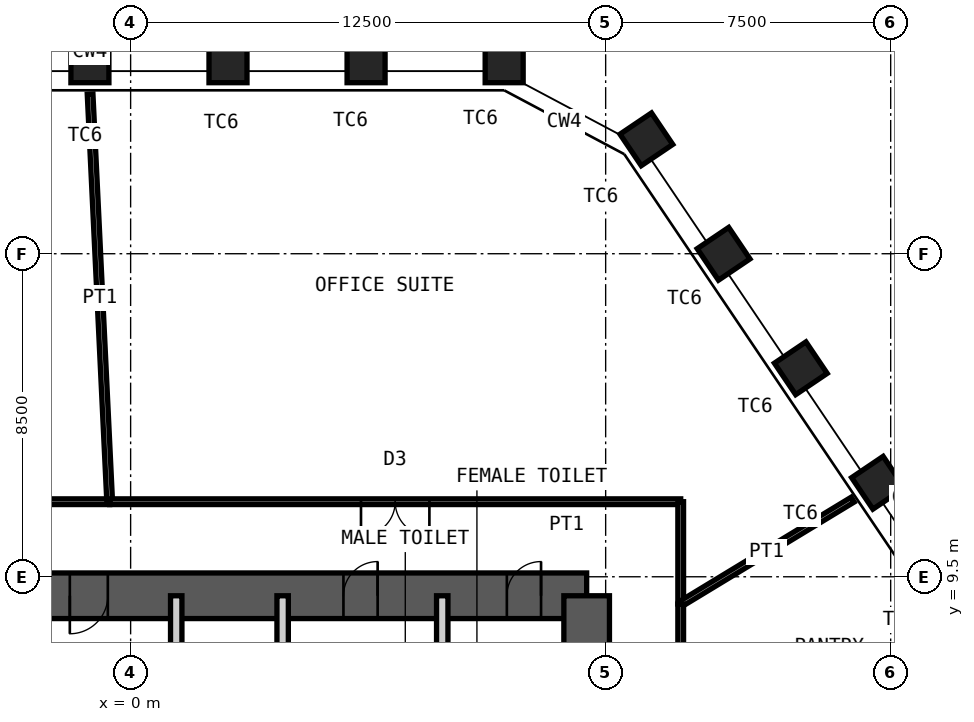
"""IFC4 building model, lengths in metres.
Left out: names, types, materials, properties, quantities, classifications, styles, units other than length and angle.
Written with IfcOpenShell. Run it as: python <this file> out.ifc"""

import sys

from ifc_helpers import new_model, si_unit, direction, frame, frame_2d, origin, origin_2d, place, context, subcontext, project, spatial, rectangle, hollow_rectangle, extrude, element, fill, save


model = new_model("IFC4")
c1 = context("Model", 3, precision=1e-05, world=origin(), true_north=direction((0.0, 1.0)))
c2 = subcontext(c1, "Body", "Model", "MODEL_VIEW")
j1 = project(units=[si_unit("LENGTHUNIT", "METRE"), si_unit("PLANEANGLEUNIT", "RADIAN")], contexts=[c1])
p1 = place(None, origin())
s1 = spatial("IfcSite", under=j1, at=p1, CompositionType="ELEMENT")
p2 = place(p1, origin())
s2 = spatial("IfcBuilding", under=s1, at=p2, CompositionType="ELEMENT")
p3 = place(p2, frame((0.0, 0.0, 222.4)))
s3 = spatial("IfcBuildingStorey", under=s2, at=p3, CompositionType="ELEMENT", Elevation=222.4)
for number, where, z_axis, x_axis in (
    (1, (-1.071, 23.0, 0.0), (0.0, 0.0, 1.0), (-1.0, 0.0, 0.0)),
    (2, (2.562, 23.0, 0.0), (0.0, 0.0, 1.0), (-1.0, 0.0, 0.0)),
    (3, (6.196, 23.0, 0.0), (0.0, 0.0, 1.0), (-1.0, 0.0, 0.0)),
    (4, (9.829, 23.0, 0.0), (0.0, 0.0, 1.0), (-1.0, 0.0, 0.0)),
    (5, (13.571, 21.01, 0.0), (0.0, 0.0, 1.0), (-0.559, 0.829, 0.0)),
    (6, (15.603, 17.998, 0.0), (0.0, 0.0, 1.0), (-0.559, 0.829, 0.0)),
    (7, (17.635, 14.986, 0.0), (0.0, 0.0, 1.0), (-0.559, 0.829, 0.0)),
    (8, (19.667, 11.973, 0.0), (0.0, 0.0, 1.0), (-0.559, 0.829, 0.0)),
):
    element("IfcColumn", number, at=place(p3, frame(where, z_axis=z_axis, x_axis=x_axis)), inside=s3, PredefinedType="COLUMN", context=c2, shape_type="SweptSolid", body=[
        extrude(hollow_rectangle(XDim=1.0, YDim=1.0, WallThickness=0.06, at=origin_2d()), origin(), (0.0, 0.0, 1.0), 4.2),
    ])
p4 = place(p3, frame((-12.0, 9.0, 0.0), z_axis=(0.0, 0.0, 1.0), x_axis=(1.0, 0.0, 0.0)))
e9 = element("IfcWall", 9, at=p4, inside=s3, PredefinedType="SHEAR", context=c2, shape_type="SweptSolid", body=[
    extrude(rectangle(XDim=24.0, YDim=1.2, at=frame_2d((12.0, 0.0))), origin(), (0.0, 0.0, 1.0), 4.2),
])
p5 = place(p4, frame((10.4, 0.0, 0.0)))
e10 = element("IfcOpeningElement", 10, at=p5, cuts=e9, PredefinedType="OPENING", context=c2, shape_type="SweptSolid", body=[
    extrude(rectangle(XDim=1.0, YDim=2.1, at=frame_2d((0.5, 1.05))), frame((0.0, 0.61, 0.0), z_axis=(0.0, -1.0, 0.0), x_axis=(1.0, 0.0, 0.0)), (0.0, 0.0, 1.0), 1.22),
])
p6 = place(p4, frame((17.6, 0.0, 0.0)))
e11 = element("IfcOpeningElement", 11, at=p6, cuts=e9, PredefinedType="OPENING", context=c2, shape_type="SweptSolid", body=[
    extrude(rectangle(XDim=0.9, YDim=2.1, at=frame_2d((0.45, 1.05))), frame((0.0, 0.61, 0.0), z_axis=(0.0, -1.0, 0.0), x_axis=(1.0, 0.0, 0.0)), (0.0, 0.0, 1.0), 1.22),
])
p7 = place(p4, frame((21.9, 0.0, 0.0)))
e12 = element("IfcOpeningElement", 12, at=p7, cuts=e9, PredefinedType="OPENING", context=c2, shape_type="SweptSolid", body=[
    extrude(rectangle(XDim=0.9, YDim=2.1, at=frame_2d((0.45, 1.05))), frame((0.0, 0.61, 0.0), z_axis=(0.0, -1.0, 0.0), x_axis=(1.0, 0.0, 0.0)), (0.0, 0.0, 1.0), 1.22),
])
p8 = place(p3, frame((12.0, -9.0, 0.0), z_axis=(0.0, 0.0, 1.0), x_axis=(0.0, 1.0, 0.0)))
e13 = element("IfcWall", 13, at=p8, inside=s3, PredefinedType="SHEAR", context=c2, shape_type="SweptSolid", body=[
    extrude(rectangle(XDim=18.0, YDim=1.2, at=frame_2d((9.0, 0.0))), origin(), (0.0, 0.0, 1.0), 4.2),
])
p9 = place(p8, frame((8.1, 0.0, 0.0)))
e14 = element("IfcOpeningElement", 14, at=p9, cuts=e13, PredefinedType="OPENING", context=c2, shape_type="SweptSolid", body=[
    extrude(rectangle(XDim=1.8, YDim=2.1, at=frame_2d((0.9, 1.05))), frame((0.0, 0.61, 0.0), z_axis=(0.0, -1.0, 0.0), x_axis=(1.0, 0.0, 0.0)), (0.0, 0.0, 1.0), 1.22),
])
p10 = place(p3, frame((1.2, 5.15, 0.0), z_axis=(0.0, 0.0, 1.0), x_axis=(0.0, 1.0, 0.0)))
e15 = element("IfcWall", 15, at=p10, inside=s3, PredefinedType="PARTITIONING", context=c2, shape_type="SweptSolid", body=[
    extrude(rectangle(XDim=3.85, YDim=0.3, at=frame_2d((1.925, 0.0))), origin(), (0.0, 0.0, 1.0), 3.98),
])
p11 = place(p10, frame((1.375, 0.0, 0.0)))
e16 = element("IfcOpeningElement", 16, at=p11, cuts=e15, PredefinedType="OPENING", context=c2, shape_type="SweptSolid", body=[
    extrude(rectangle(XDim=1.1, YDim=2.4, at=frame_2d((0.55, 1.2))), frame((0.0, 0.16, 0.0), z_axis=(0.0, -1.0, 0.0), x_axis=(1.0, 0.0, 0.0)), (0.0, 0.0, 1.0), 0.32),
])
for number, where, z_axis, x_axis in (
    (17, (4.0, 5.15, 0.0), (0.0, 0.0, 1.0), (0.0, 1.0, 0.0)),
    (18, (8.2, 5.15, 0.0), (0.0, 0.0, 1.0), (0.0, 1.0, 0.0)),
):
    element("IfcWall", number, at=place(p3, frame(where, z_axis=z_axis, x_axis=x_axis)), inside=s3, PredefinedType="PARTITIONING", context=c2, shape_type="SweptSolid", body=[
        extrude(rectangle(XDim=3.85, YDim=0.3, at=frame_2d((1.925, 0.0))), origin(), (0.0, 0.0, 1.0), 3.98),
    ])
p12 = place(p3, frame((-8.267, 11.475, 0.0), z_axis=(0.0, 0.0, 1.0), x_axis=(1.0, 0.0, 0.0)))
e19 = element("IfcWall", 19, at=p12, inside=s3, PredefinedType="PARTITIONING", context=c2, shape_type="SweptSolid", body=[
    extrude(rectangle(XDim=7.716, YDim=0.15, at=frame_2d((3.858, 0.0))), origin(), (0.0, 0.0, 1.0), 4.03),
])
p13 = place(p12, frame((2.958, 0.0, 0.0)))
e20 = element("IfcOpeningElement", 20, at=p13, cuts=e19, PredefinedType="OPENING", context=c2, shape_type="SweptSolid", body=[
    extrude(rectangle(XDim=1.8, YDim=2.4, at=frame_2d((0.9, 1.2))), frame((0.0, 0.085, 0.0), z_axis=(0.0, -1.0, 0.0), x_axis=(1.0, 0.0, 0.0)), (0.0, 0.0, 1.0), 0.17),
])
p14 = place(p3, frame((-1.067, 22.2, 0.0), z_axis=(0.0, 0.0, 1.0), x_axis=(0.047998335863, -0.998847415652, 0.0)))
e21 = element("IfcWall", 21, at=p14, inside=s3, PredefinedType="PARTITIONING", context=c2, shape_type="SweptSolid", body=[
    extrude(rectangle(XDim=10.738, YDim=0.15, at=frame_2d((5.369, 0.0))), origin(), (0.0, 0.0, 1.0), 3.43),
])
p15 = place(p3, frame((-0.551, 11.475, 0.0), z_axis=(0.0, 0.0, 1.0), x_axis=(1.0, 0.0, 0.0)))
e22 = element("IfcWall", 22, at=p15, inside=s3, PredefinedType="PARTITIONING", context=c2, shape_type="SweptSolid", body=[
    extrude(rectangle(XDim=15.026, YDim=0.15, at=frame_2d((7.513, 0.0))), origin(), (0.0, 0.0, 1.0), 4.03),
])
p16 = place(p15, frame((6.613, 0.0, 0.0)))
e23 = element("IfcOpeningElement", 23, at=p16, cuts=e22, PredefinedType="OPENING", context=c2, shape_type="SweptSolid", body=[
    extrude(rectangle(XDim=1.8, YDim=2.4, at=frame_2d((0.9, 1.2))), frame((0.0, 0.085, 0.0), z_axis=(0.0, -1.0, 0.0), x_axis=(1.0, 0.0, 0.0)), (0.0, 0.0, 1.0), 0.17),
])
p17 = place(p3, frame((14.475, 11.475, 0.0), z_axis=(0.0, 0.0, 1.0), x_axis=(0.0, -1.0, 0.0)))
e24 = element("IfcWall", 24, at=p17, inside=s3, PredefinedType="PARTITIONING", context=c2, shape_type="SweptSolid", body=[
    extrude(rectangle(XDim=2.692, YDim=0.15, at=frame_2d((1.346, 0.0))), origin(), (0.0, 0.0, 1.0), 4.03),
])
p18 = place(p3, frame((19.001, 11.53, 0.0), z_axis=(0.0, 0.0, 1.0), x_axis=(-0.854906581035, -0.518781975114, 0.0)))
e25 = element("IfcWall", 25, at=p18, inside=s3, PredefinedType="PARTITIONING", context=c2, shape_type="SweptSolid", body=[
    extrude(rectangle(XDim=5.294, YDim=0.15, at=frame_2d((2.647, 0.0))), origin(), (0.0, 0.0, 1.0), 3.43),
])
p19 = place(p3, frame((14.475, 8.783, 0.0), z_axis=(0.0, 0.0, 1.0), x_axis=(0.0, -1.0, 0.0)))
e26 = element("IfcWall", 26, at=p19, inside=s3, PredefinedType="PARTITIONING", context=c2, shape_type="SweptSolid", body=[
    extrude(rectangle(XDim=5.309, YDim=0.15, at=frame_2d((2.654, 0.0))), origin(), (0.0, 0.0, 1.0), 4.03),
])
p20 = place(p19, frame((2.154, 0.0, 0.0)))
e27 = element("IfcOpeningElement", 27, at=p20, cuts=e26, PredefinedType="OPENING", context=c2, shape_type="SweptSolid", body=[
    extrude(rectangle(XDim=1.0, YDim=2.4, at=frame_2d((0.5, 1.2))), frame((0.0, 0.085, 0.0), z_axis=(0.0, -1.0, 0.0), x_axis=(1.0, 0.0, 0.0)), (0.0, 0.0, 1.0), 0.17),
])
p21 = place(p5, origin())
e28 = element("IfcDoor", 28, at=p21, inside=s3, OperationType="SINGLE_SWING_LEFT", PredefinedType="DOOR", context=c2, shape_type="SweptSolid", body=[
    extrude(rectangle(XDim=1.0, YDim=2.1, at=frame_2d((0.5, 1.05))), frame((0.0, 0.025, 0.0), z_axis=(0.0, -1.0, 0.0), x_axis=(1.0, 0.0, 0.0)), (0.0, 0.0, 1.0), 0.05),
])
fill(e10, e28)
p22 = place(p6, origin())
e29 = element("IfcDoor", 29, at=p22, inside=s3, OperationType="SINGLE_SWING_LEFT", PredefinedType="DOOR", context=c2, shape_type="SweptSolid", body=[
    extrude(rectangle(XDim=0.9, YDim=2.1, at=frame_2d((0.45, 1.05))), frame((0.0, 0.025, 0.0), z_axis=(0.0, -1.0, 0.0), x_axis=(1.0, 0.0, 0.0)), (0.0, 0.0, 1.0), 0.05),
])
fill(e11, e29)
p23 = place(p7, origin())
e30 = element("IfcDoor", 30, at=p23, inside=s3, OperationType="SINGLE_SWING_LEFT", PredefinedType="DOOR", context=c2, shape_type="SweptSolid", body=[
    extrude(rectangle(XDim=0.9, YDim=2.1, at=frame_2d((0.45, 1.05))), frame((0.0, 0.025, 0.0), z_axis=(0.0, -1.0, 0.0), x_axis=(1.0, 0.0, 0.0)), (0.0, 0.0, 1.0), 0.05),
])
fill(e12, e30)
p24 = place(p16, origin())
e31 = element("IfcDoor", 31, at=p24, inside=s3, OperationType="DOUBLE_DOOR_DOUBLE_SWING", PredefinedType="DOOR", context=c2, shape_type="SweptSolid", body=[
    extrude(rectangle(XDim=1.8, YDim=2.4, at=frame_2d((0.9, 1.2))), frame((0.0, 0.025, 0.0), z_axis=(0.0, -1.0, 0.0), x_axis=(1.0, 0.0, 0.0)), (0.0, 0.0, 1.0), 0.05),
])
fill(e23, e31)
save(model, sys.argv[1])
